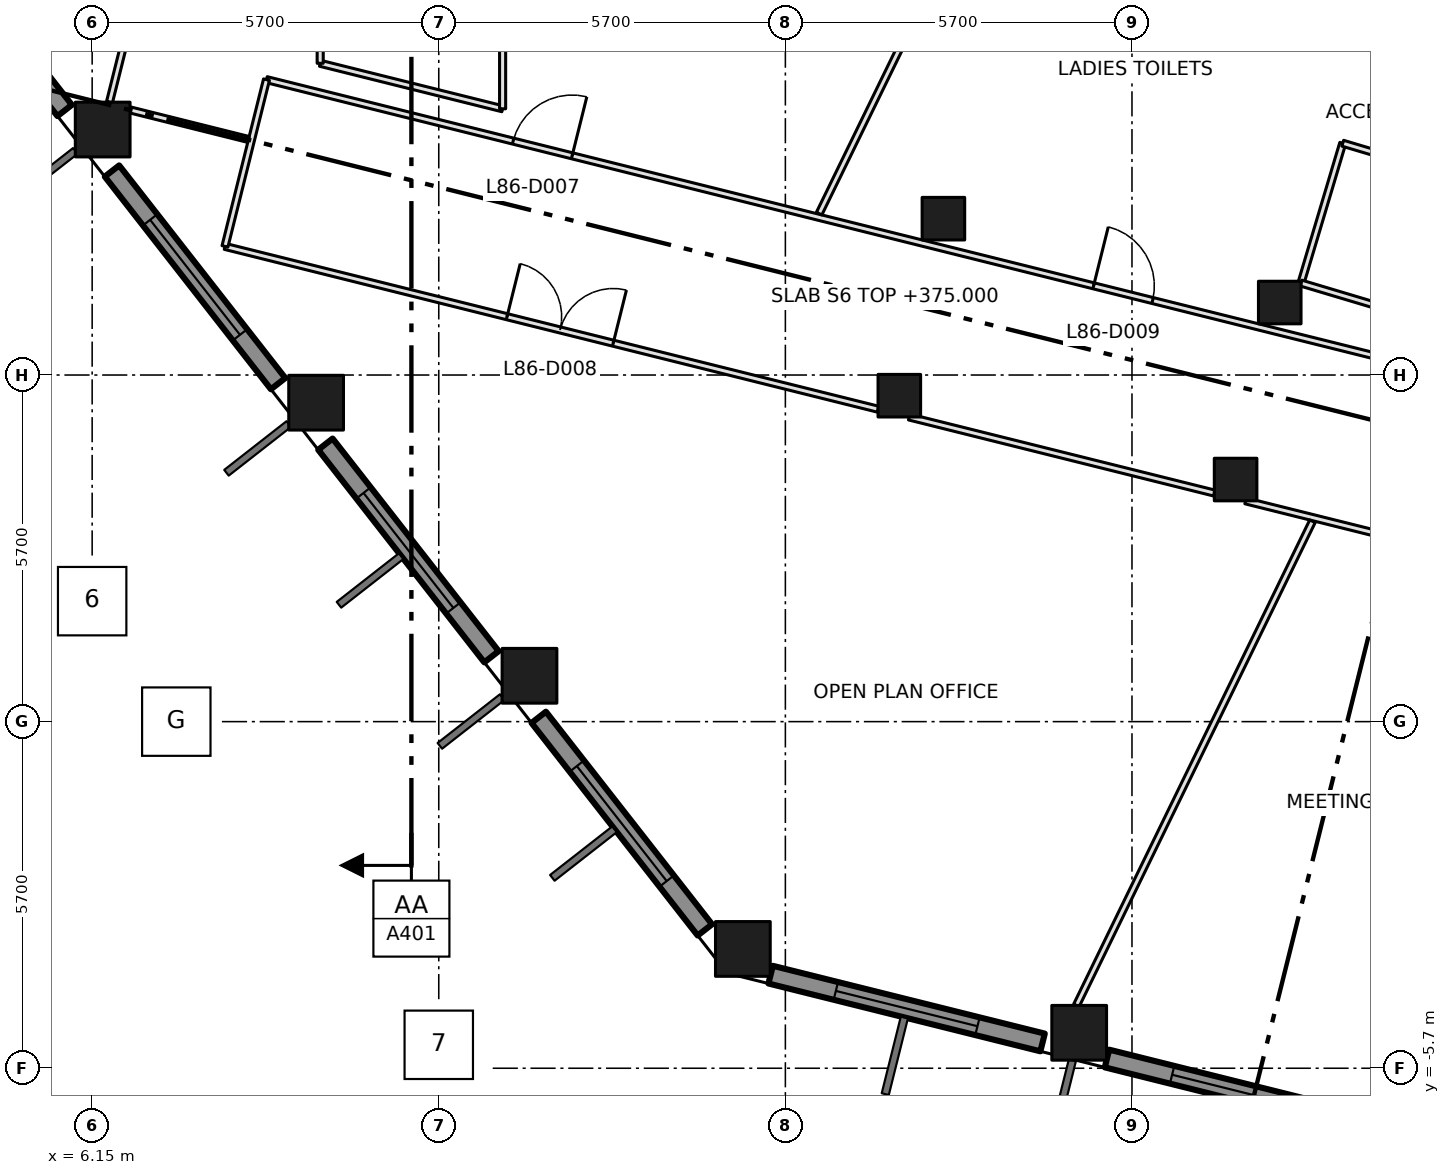
"""IFC4 building model, lengths in metres.
Left out: names, types, materials, properties, quantities, classifications, styles, units other than length and angle.
Written with IfcOpenShell. Run it as: python <this file> out.ifc"""

import sys

from ifc_helpers import new_model, si_unit, direction, frame, frame_2d, origin, origin_2d, place, context, subcontext, project, spatial, rectangle, extrude, element, fill, save


model = new_model("IFC4")
c1 = context("Model", 3, precision=1e-05, world=origin(), true_north=direction((0.0, 1.0)))
c2 = subcontext(c1, "Body", "Model", "MODEL_VIEW")
j1 = project(units=[si_unit("LENGTHUNIT", "METRE"), si_unit("PLANEANGLEUNIT", "RADIAN")], contexts=[c1])
p1 = place(None, origin())
s1 = spatial("IfcSite", under=j1, at=p1, CompositionType="ELEMENT")
p2 = place(p1, origin())
s2 = spatial("IfcBuilding", under=s1, at=p2, CompositionType="ELEMENT")
p3 = place(p2, frame((0.0, 0.0, 375.0)))
s3 = spatial("IfcBuildingStorey", under=s2, at=p3, CompositionType="ELEMENT", Elevation=375.0)
for number, where, z_axis, x_axis in (
    (1, (16.851, -3.738, 0.0), (0.0, 0.0, 1.0), (1.0, 0.0, 0.0)),
    (2, (13.342, 0.754, 0.0), (0.0, 0.0, 1.0), (1.0, 0.0, 0.0)),
    (3, (9.833, 5.245, 0.0), (0.0, 0.0, 1.0), (1.0, 0.0, 0.0)),
    (4, (6.323, 9.737, 0.0), (0.0, 0.0, 1.0), (1.0, 0.0, 0.0)),
    (5, (22.382, -5.117, 0.0), (0.0, 0.0, 1.0), (1.0, 0.0, 0.0)),
):
    element("IfcColumn", number, at=place(p3, frame(where, z_axis=z_axis, x_axis=x_axis)), inside=s3, PredefinedType="COLUMN", context=c2, shape_type="SweptSolid", body=[
        extrude(rectangle(XDim=0.9, YDim=0.9, at=origin_2d()), origin(), (0.0, 0.0, 1.0), 4.2),
    ])
for number, where, z_axis, x_axis in (
    (6, (19.424, 5.36, 0.0), (0.0, 0.0, 1.0), (1.0, 0.0, 0.0)),
    (7, (24.954, 3.981, 0.0), (0.0, 0.0, 1.0), (1.0, 0.0, 0.0)),
    (8, (20.149, 8.271, 0.0), (0.0, 0.0, 1.0), (1.0, 0.0, 0.0)),
    (9, (25.68, 6.892, 0.0), (0.0, 0.0, 1.0), (1.0, 0.0, 0.0)),
):
    element("IfcColumn", number, at=place(p3, frame(where, z_axis=z_axis, x_axis=x_axis)), inside=s3, PredefinedType="COLUMN", context=c2, shape_type="SweptSolid", body=[
        extrude(rectangle(XDim=0.7, YDim=0.7, at=origin_2d()), origin(), (0.0, 0.0, 1.0), 4.2),
    ])
p4 = place(p3, frame((2.967, 13.547, 0.0), z_axis=(0.0, 0.0, 1.0), x_axis=(0.615486001463, -0.788147817356, 0.0)))
e10 = element("IfcWall", 10, at=p4, inside=s3, PredefinedType="SOLIDWALL", context=c2, shape_type="SweptSolid", body=[
    extrude(rectangle(XDim=4.437, YDim=0.3, at=frame_2d((2.219, 0.0))), origin(), (0.0, 0.0, 1.0), 3.2),
])
p5 = place(p4, frame((1.018, 0.0, 0.8)))
e11 = element("IfcOpeningElement", 11, at=p5, cuts=e10, PredefinedType="OPENING", context=c2, shape_type="SweptSolid", body=[
    extrude(rectangle(XDim=2.4, YDim=2.1, at=frame_2d((1.2, 1.05))), frame((0.0, 0.16, 0.0), z_axis=(0.0, -1.0, 0.0), x_axis=(1.0, 0.0, 0.0)), (0.0, 0.0, 1.0), 0.32),
])
p6 = place(p3, frame((6.476, 9.055, 0.0), z_axis=(0.0, 0.0, 1.0), x_axis=(0.615649380255, -0.788020203162, 0.0)))
e12 = element("IfcWall", 12, at=p6, inside=s3, PredefinedType="SOLIDWALL", context=c2, shape_type="SweptSolid", body=[
    extrude(rectangle(XDim=4.438, YDim=0.3, at=frame_2d((2.219, 0.0))), origin(), (0.0, 0.0, 1.0), 3.2),
])
p7 = place(p6, frame((1.019, 0.0, 0.8)))
e13 = element("IfcOpeningElement", 13, at=p7, cuts=e12, PredefinedType="OPENING", context=c2, shape_type="SweptSolid", body=[
    extrude(rectangle(XDim=2.4, YDim=2.1, at=frame_2d((1.2, 1.05))), frame((0.0, 0.16, 0.0), z_axis=(0.0, -1.0, 0.0), x_axis=(1.0, 0.0, 0.0)), (0.0, 0.0, 1.0), 0.32),
])
p8 = place(p3, frame((9.986, 4.563, 0.0), z_axis=(0.0, 0.0, 1.0), x_axis=(0.615592779411, -0.788064419915, 0.0)))
e14 = element("IfcWall", 14, at=p8, inside=s3, PredefinedType="SOLIDWALL", context=c2, shape_type="SweptSolid", body=[
    extrude(rectangle(XDim=4.436, YDim=0.3, at=frame_2d((2.218, 0.0))), origin(), (0.0, 0.0, 1.0), 3.2),
])
p9 = place(p8, frame((1.018, 0.0, 0.8)))
e15 = element("IfcOpeningElement", 15, at=p9, cuts=e14, PredefinedType="OPENING", context=c2, shape_type="SweptSolid", body=[
    extrude(rectangle(XDim=2.4, YDim=2.1, at=frame_2d((1.2, 1.05))), frame((0.0, 0.16, 0.0), z_axis=(0.0, -1.0, 0.0), x_axis=(1.0, 0.0, 0.0)), (0.0, 0.0, 1.0), 0.32),
])
p10 = place(p3, frame((13.494, 0.071, 0.0), z_axis=(0.0, 0.0, 1.0), x_axis=(0.615763624226, -0.787930935476, 0.0)))
e16 = element("IfcWall", 16, at=p10, inside=s3, PredefinedType="SOLIDWALL", context=c2, shape_type="SweptSolid", body=[
    extrude(rectangle(XDim=4.437, YDim=0.3, at=frame_2d((2.219, 0.0))), origin(), (0.0, 0.0, 1.0), 3.2),
])
p11 = place(p10, frame((1.018, 0.0, 0.8)))
e17 = element("IfcOpeningElement", 17, at=p11, cuts=e16, PredefinedType="OPENING", context=c2, shape_type="SweptSolid", body=[
    extrude(rectangle(XDim=2.4, YDim=2.1, at=frame_2d((1.2, 1.05))), frame((0.0, 0.16, 0.0), z_axis=(0.0, -1.0, 0.0), x_axis=(1.0, 0.0, 0.0)), (0.0, 0.0, 1.0), 0.32),
])
p12 = place(p3, frame((17.308, -4.161, 0.0), z_axis=(0.0, 0.0, 1.0), x_axis=(0.970294992984, -0.241924836652, 0.0)))
e18 = element("IfcWall", 18, at=p12, inside=s3, PredefinedType="SOLIDWALL", context=c2, shape_type="SweptSolid", body=[
    extrude(rectangle(XDim=4.609, YDim=0.3, at=frame_2d((2.304, 0.0))), origin(), (0.0, 0.0, 1.0), 3.2),
])
p13 = place(p12, frame((1.105, 0.0, 0.8)))
e19 = element("IfcOpeningElement", 19, at=p13, cuts=e18, PredefinedType="OPENING", context=c2, shape_type="SweptSolid", body=[
    extrude(rectangle(XDim=2.4, YDim=2.1, at=frame_2d((1.2, 1.05))), frame((0.0, 0.16, 0.0), z_axis=(0.0, -1.0, 0.0), x_axis=(1.0, 0.0, 0.0)), (0.0, 0.0, 1.0), 0.32),
])
p14 = place(p3, frame((22.839, -5.54, 0.0), z_axis=(0.0, 0.0, 1.0), x_axis=(0.970282587769, -0.241974585177, 0.0)))
e20 = element("IfcWall", 20, at=p14, inside=s3, PredefinedType="SOLIDWALL", context=c2, shape_type="SweptSolid", body=[
    extrude(rectangle(XDim=4.608, YDim=0.3, at=frame_2d((2.304, 0.0))), origin(), (0.0, 0.0, 1.0), 3.2),
])
p15 = place(p14, frame((1.104, 0.0, 0.8)))
e21 = element("IfcOpeningElement", 21, at=p15, cuts=e20, PredefinedType="OPENING", context=c2, shape_type="SweptSolid", body=[
    extrude(rectangle(XDim=2.4, YDim=2.1, at=frame_2d((1.2, 1.05))), frame((0.0, 0.16, 0.0), z_axis=(0.0, -1.0, 0.0), x_axis=(1.0, 0.0, 0.0)), (0.0, 0.0, 1.0), 0.32),
])
p16 = place(p3, frame((8.334, 7.815, 0.0), z_axis=(0.0, 0.0, 1.0), x_axis=(0.970312231044, -0.241855688968, 0.0)))
e22 = element("IfcWall", 22, at=p16, inside=s3, PredefinedType="PARTITIONING", context=c2, shape_type="SweptSolid", body=[
    extrude(rectangle(XDim=11.069, YDim=0.1, at=frame_2d((5.534, 0.0))), origin(), (0.0, 0.0, 1.0), 3.9),
])
p17 = place(p16, frame((4.78, 0.0, 0.0)))
e23 = element("IfcOpeningElement", 23, at=p17, cuts=e22, PredefinedType="OPENING", context=c2, shape_type="SweptSolid", body=[
    extrude(rectangle(XDim=1.8, YDim=2.1, at=frame_2d((0.9, 1.05))), frame((0.0, 0.06, 0.0), z_axis=(0.0, -1.0, 0.0), x_axis=(1.0, 0.0, 0.0)), (0.0, 0.0, 1.0), 0.12),
])
p18 = place(p3, frame((9.017, 10.558, 0.0), z_axis=(0.0, 0.0, 1.0), x_axis=(0.970297621765, -0.241914293082, 0.0)))
e24 = element("IfcWall", 24, at=p18, inside=s3, PredefinedType="PARTITIONING", context=c2, shape_type="SweptSolid", body=[
    extrude(rectangle(XDim=19.879, YDim=0.1, at=frame_2d((9.94, 0.0))), origin(), (0.0, 0.0, 1.0), 3.9),
])
p19 = place(p18, frame((4.18, 0.0, 0.0)))
e25 = element("IfcOpeningElement", 25, at=p19, cuts=e24, PredefinedType="OPENING", context=c2, shape_type="SweptSolid", body=[
    extrude(rectangle(XDim=1.0, YDim=2.1, at=frame_2d((0.5, 1.05))), frame((0.0, 0.06, 0.0), z_axis=(0.0, -1.0, 0.0), x_axis=(1.0, 0.0, 0.0)), (0.0, 0.0, 1.0), 0.12),
])
p20 = place(p18, frame((14.018, 0.0, 0.0)))
e26 = element("IfcOpeningElement", 26, at=p20, cuts=e24, PredefinedType="OPENING", context=c2, shape_type="SweptSolid", body=[
    extrude(rectangle(XDim=1.0, YDim=2.1, at=frame_2d((0.5, 1.05))), frame((0.0, 0.06, 0.0), z_axis=(0.0, -1.0, 0.0), x_axis=(1.0, 0.0, 0.0)), (0.0, 0.0, 1.0), 0.12),
])
p21 = place(p3, frame((9.017, 10.558, 0.0), z_axis=(0.0, 0.0, 1.0), x_axis=(-0.241641419317, -0.970365613813, 0.0)))
e27 = element("IfcWall", 27, at=p21, inside=s3, PredefinedType="PARTITIONING", context=c2, shape_type="SweptSolid", body=[
    extrude(rectangle(XDim=2.827, YDim=0.1, at=frame_2d((1.414, 0.0))), origin(), (0.0, 0.0, 1.0), 3.9),
])
p22 = place(p3, frame((9.9, 10.826, 0.0), z_axis=(0.0, 0.0, 1.0), x_axis=(0.970290953223, -0.241941038466, 0.0)))
e28 = element("IfcWall", 28, at=p22, inside=s3, PredefinedType="PARTITIONING", context=c2, shape_type="SweptSolid", body=[
    extrude(rectangle(XDim=3.092, YDim=0.1, at=frame_2d((1.546, 0.0))), origin(), (0.0, 0.0, 1.0), 3.9),
])
p23 = place(p3, frame((9.9, 12.2, 0.0), z_axis=(0.0, 0.0, 1.0), x_axis=(0.0, -1.0, 0.0)))
e29 = element("IfcWall", 29, at=p23, inside=s3, PredefinedType="PARTITIONING", context=c2, shape_type="SweptSolid", body=[
    extrude(rectangle(XDim=1.374, YDim=0.1, at=frame_2d((0.687, 0.0))), origin(), (0.0, 0.0, 1.0), 3.9),
])
p24 = place(p3, frame((12.9, 10.078, 0.0), z_axis=(0.0, 0.0, 1.0), x_axis=(0.0, 1.0, 0.0)))
e30 = element("IfcWall", 30, at=p24, inside=s3, PredefinedType="PARTITIONING", context=c2, shape_type="SweptSolid", body=[
    extrude(rectangle(XDim=4.022, YDim=0.1, at=frame_2d((2.011, 0.0))), origin(), (0.0, 0.0, 1.0), 3.9),
])
p25 = place(p3, frame((19.586, 5.01, 0.0), z_axis=(0.0, 0.0, 1.0), x_axis=(0.970303347181, -0.241891327769, 0.0)))
e31 = element("IfcWall", 31, at=p25, inside=s3, PredefinedType="PARTITIONING", context=c2, shape_type="SweptSolid", body=[
    extrude(rectangle(XDim=5.172, YDim=0.1, at=frame_2d((2.586, 0.0))), origin(), (0.0, 0.0, 1.0), 3.9),
])
p26 = place(p3, frame((25.118, 3.631, 0.0), z_axis=(0.0, 0.0, 1.0), x_axis=(0.970281210621, -0.241980107272, 0.0)))
e32 = element("IfcWall", 32, at=p26, inside=s3, PredefinedType="PARTITIONING", context=c2, shape_type="SweptSolid", body=[
    extrude(rectangle(XDim=5.171, YDim=0.1, at=frame_2d((2.585, 0.0))), origin(), (0.0, 0.0, 1.0), 3.9),
])
p27 = place(p26, frame((2.629, 0.0, 0.0)))
e33 = element("IfcOpeningElement", 33, at=p27, cuts=e32, PredefinedType="OPENING", context=c2, shape_type="SweptSolid", body=[
    extrude(rectangle(XDim=1.0, YDim=2.1, at=frame_2d((0.5, 1.05))), frame((0.0, 0.06, 0.0), z_axis=(0.0, -1.0, 0.0), x_axis=(1.0, 0.0, 0.0)), (0.0, 0.0, 1.0), 0.12),
])
p28 = place(p3, frame((6.922, 12.138, 0.0), z_axis=(0.0, 0.0, 1.0), x_axis=(-0.24222136375, -0.97022101139, 0.0)))
e34 = element("IfcWall", 34, at=p28, inside=s3, PredefinedType="PARTITIONING", context=c2, shape_type="SweptSolid", body=[
    extrude(rectangle(XDim=2.011, YDim=0.1, at=frame_2d((1.005, 0.0))), origin(), (0.0, 0.0, 1.0), 3.9),
])
p29 = place(p3, frame((8.72, 9.574, 0.0), z_axis=(0.0, 0.0, 1.0), x_axis=(-0.970221168815, 0.24222073318, 0.0)))
e35 = element("IfcWall", 35, at=p29, inside=s3, PredefinedType="PARTITIONING", context=c2, shape_type="SweptSolid", body=[
    extrude(rectangle(XDim=2.007, YDim=0.1, at=frame_2d((1.003, 0.0))), origin(), (0.0, 0.0, 1.0), 3.9),
])
p30 = place(p3, frame((18.105, 8.354, 0.0), z_axis=(0.0, 0.0, 1.0), x_axis=(0.438424384383, 0.898768078638, 0.0)))
e36 = element("IfcWall", 36, at=p30, inside=s3, PredefinedType="PARTITIONING", context=c2, shape_type="SweptSolid", body=[
    extrude(rectangle(XDim=6.393, YDim=0.1, at=frame_2d((3.197, 0.0))), origin(), (0.0, 0.0, 1.0), 3.9),
])
p31 = place(p3, frame((22.336, -4.667, 0.0), z_axis=(0.0, 0.0, 1.0), x_axis=(0.438261260169, 0.89884763327, 0.0)))
e37 = element("IfcWall", 37, at=p31, inside=s3, PredefinedType="PARTITIONING", context=c2, shape_type="SweptSolid", body=[
    extrude(rectangle(XDim=8.858, YDim=0.1, at=frame_2d((4.429, 0.0))), origin(), (0.0, 0.0, 1.0), 3.9),
])
p32 = place(p3, frame((26.03, 7.214, 0.0), z_axis=(0.0, 0.0, 1.0), x_axis=(0.286077381682, 0.958206518288, 0.0)))
e38 = element("IfcWall", 38, at=p32, inside=s3, PredefinedType="PARTITIONING", context=c2, shape_type="SweptSolid", body=[
    extrude(rectangle(XDim=2.398, YDim=0.1, at=frame_2d((1.199, 0.0))), origin(), (0.0, 0.0, 1.0), 3.9),
])
p33 = place(p3, frame((26.716, 9.512, 0.0), z_axis=(0.0, 0.0, 1.0), x_axis=(0.958168093169, -0.286206053804, 0.0)))
e39 = element("IfcWall", 39, at=p33, inside=s3, PredefinedType="PARTITIONING", context=c2, shape_type="SweptSolid", body=[
    extrude(rectangle(XDim=2.551, YDim=0.1, at=frame_2d((1.275, 0.0))), origin(), (0.0, 0.0, 1.0), 3.9),
])
p34 = place(p3, frame((28.473, 6.482, 0.0), z_axis=(0.0, 0.0, 1.0), x_axis=(-0.958136712348, 0.286311090338, 0.0)))
e40 = element("IfcWall", 40, at=p34, inside=s3, PredefinedType="PARTITIONING", context=c2, shape_type="SweptSolid", body=[
    extrude(rectangle(XDim=2.55, YDim=0.1, at=frame_2d((1.275, 0.0))), origin(), (0.0, 0.0, 1.0), 3.9),
])
p35 = place(p7, origin())
e41 = element("IfcWindow", 41, at=p35, inside=s3, PartitioningType="DOUBLE_PANEL_VERTICAL", PredefinedType="WINDOW", context=c2, shape_type="SweptSolid", body=[
    extrude(rectangle(XDim=2.4, YDim=2.1, at=frame_2d((1.2, 1.05))), frame((0.0, 0.03, 0.0), z_axis=(0.0, -1.0, 0.0), x_axis=(1.0, 0.0, 0.0)), (0.0, 0.0, 1.0), 0.06),
])
fill(e13, e41)
p36 = place(p9, origin())
e42 = element("IfcWindow", 42, at=p36, inside=s3, PartitioningType="DOUBLE_PANEL_VERTICAL", PredefinedType="WINDOW", context=c2, shape_type="SweptSolid", body=[
    extrude(rectangle(XDim=2.4, YDim=2.1, at=frame_2d((1.2, 1.05))), frame((0.0, 0.03, 0.0), z_axis=(0.0, -1.0, 0.0), x_axis=(1.0, 0.0, 0.0)), (0.0, 0.0, 1.0), 0.06),
])
fill(e15, e42)
p37 = place(p11, origin())
e43 = element("IfcWindow", 43, at=p37, inside=s3, PartitioningType="DOUBLE_PANEL_VERTICAL", PredefinedType="WINDOW", context=c2, shape_type="SweptSolid", body=[
    extrude(rectangle(XDim=2.4, YDim=2.1, at=frame_2d((1.2, 1.05))), frame((0.0, 0.03, 0.0), z_axis=(0.0, -1.0, 0.0), x_axis=(1.0, 0.0, 0.0)), (0.0, 0.0, 1.0), 0.06),
])
fill(e17, e43)
p38 = place(p13, origin())
e44 = element("IfcWindow", 44, at=p38, inside=s3, PartitioningType="DOUBLE_PANEL_VERTICAL", PredefinedType="WINDOW", context=c2, shape_type="SweptSolid", body=[
    extrude(rectangle(XDim=2.4, YDim=2.1, at=frame_2d((1.2, 1.05))), frame((0.0, 0.03, 0.0), z_axis=(0.0, -1.0, 0.0), x_axis=(1.0, 0.0, 0.0)), (0.0, 0.0, 1.0), 0.06),
])
fill(e19, e44)
p39 = place(p15, origin())
e45 = element("IfcWindow", 45, at=p39, inside=s3, PartitioningType="DOUBLE_PANEL_VERTICAL", PredefinedType="WINDOW", context=c2, shape_type="SweptSolid", body=[
    extrude(rectangle(XDim=2.4, YDim=2.1, at=frame_2d((1.2, 1.05))), frame((0.0, 0.03, 0.0), z_axis=(0.0, -1.0, 0.0), x_axis=(1.0, 0.0, 0.0)), (0.0, 0.0, 1.0), 0.06),
])
fill(e21, e45)
p40 = place(p19, origin())
e46 = element("IfcDoor", 46, at=p40, inside=s3, OperationType="SINGLE_SWING_RIGHT", PredefinedType="DOOR", context=c2, shape_type="SweptSolid", body=[
    extrude(rectangle(XDim=1.0, YDim=2.1, at=frame_2d((0.5, 1.05))), frame((0.0, 0.025, 0.0), z_axis=(0.0, -1.0, 0.0), x_axis=(1.0, 0.0, 0.0)), (0.0, 0.0, 1.0), 0.05),
])
fill(e25, e46)
p41 = place(p17, origin())
e47 = element("IfcDoor", 47, at=p41, inside=s3, OperationType="DOUBLE_DOOR_SINGLE_SWING", PredefinedType="DOOR", context=c2, shape_type="SweptSolid", body=[
    extrude(rectangle(XDim=1.8, YDim=2.1, at=frame_2d((0.9, 1.05))), frame((0.0, 0.025, 0.0), z_axis=(0.0, -1.0, 0.0), x_axis=(1.0, 0.0, 0.0)), (0.0, 0.0, 1.0), 0.05),
])
fill(e23, e47)
p42 = place(p20, origin())
e48 = element("IfcDoor", 48, at=p42, inside=s3, OperationType="SINGLE_SWING_LEFT", PredefinedType="DOOR", context=c2, shape_type="SweptSolid", body=[
    extrude(rectangle(XDim=1.0, YDim=2.1, at=frame_2d((0.5, 1.05))), frame((0.0, 0.025, 0.0), z_axis=(0.0, -1.0, 0.0), x_axis=(1.0, 0.0, 0.0)), (0.0, 0.0, 1.0), 0.05),
])
fill(e26, e48)
save(model, sys.argv[1])
